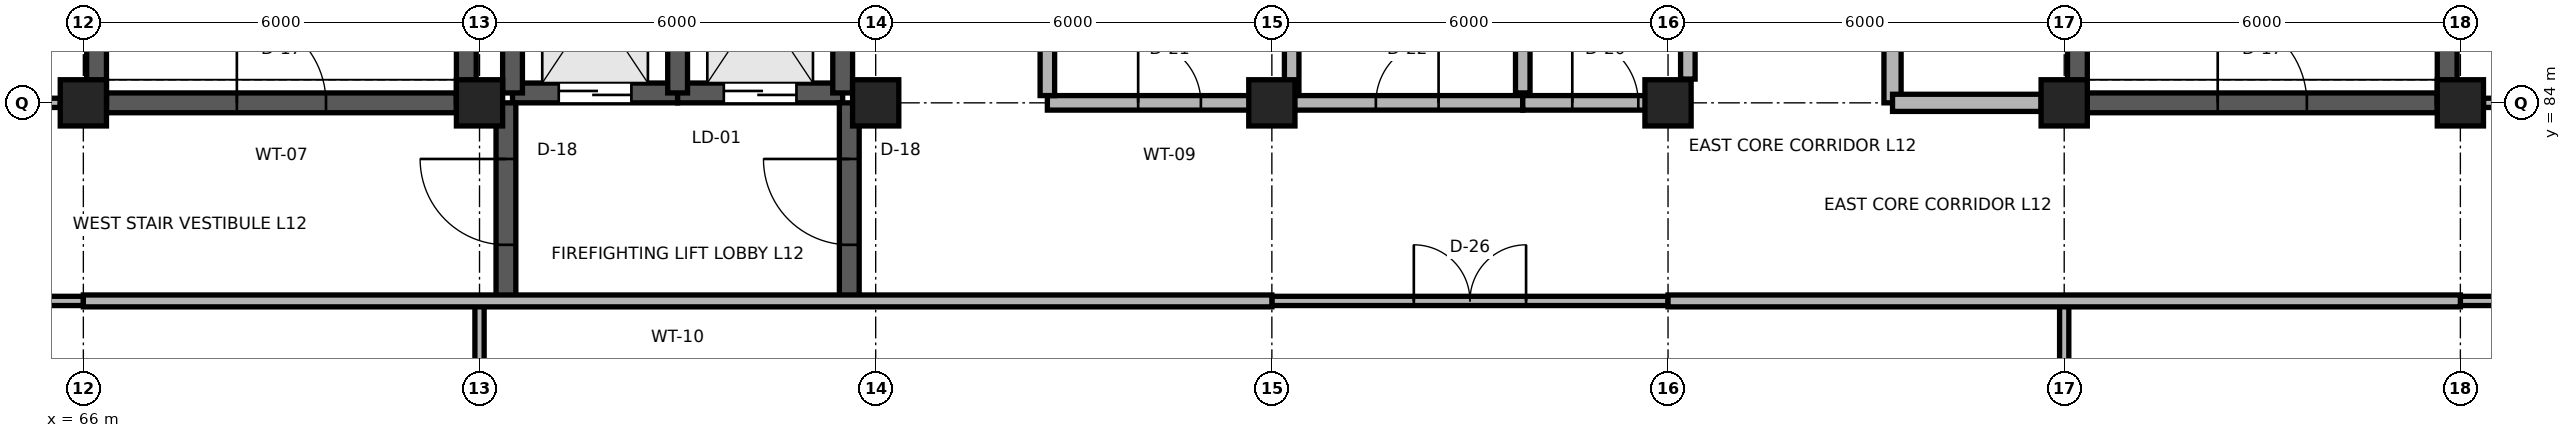
"""IFC4 building model, lengths in metres.
Left out: names, types, materials, properties, quantities, classifications, styles, units other than length and angle.
Written with IfcOpenShell. Run it as: python <this file> out.ifc"""

import sys

from ifc_helpers import new_model, si_unit, direction, frame, frame_2d, origin, origin_2d, place, context, subcontext, project, spatial, rectangle, extrude, element, fill, save


model = new_model("IFC4")
c1 = context("Model", 3, precision=1e-05, world=origin(), true_north=direction((0.0, 1.0)))
c2 = subcontext(c1, "Body", "Model", "MODEL_VIEW")
j1 = project(units=[si_unit("LENGTHUNIT", "METRE"), si_unit("PLANEANGLEUNIT", "RADIAN")], contexts=[c1])
p1 = place(None, origin())
s1 = spatial("IfcSite", under=j1, at=p1, CompositionType="ELEMENT")
p2 = place(p1, origin())
s2 = spatial("IfcBuilding", under=s1, at=p2, CompositionType="ELEMENT")
p3 = place(p2, frame((0.0, 0.0, 48.3)))
s3 = spatial("IfcBuildingStorey", under=s2, at=p3, CompositionType="ELEMENT", Elevation=48.3)
for number, where, z_axis, x_axis in (
    (1, (66.0, 84.0, 0.0), (0.0, 0.0, 1.0), (1.0, 0.0, 0.0)),
    (2, (72.0, 84.0, 0.0), (0.0, 0.0, 1.0), (1.0, 0.0, 0.0)),
    (3, (78.0, 84.0, 0.0), (0.0, 0.0, 1.0), (1.0, 0.0, 0.0)),
    (4, (84.0, 84.0, 0.0), (0.0, 0.0, 1.0), (1.0, 0.0, 0.0)),
    (5, (90.0, 84.0, 0.0), (0.0, 0.0, 1.0), (1.0, 0.0, 0.0)),
    (6, (96.0, 84.0, 0.0), (0.0, 0.0, 1.0), (1.0, 0.0, 0.0)),
    (7, (102.0, 84.0, 0.0), (0.0, 0.0, 1.0), (1.0, 0.0, 0.0)),
):
    element("IfcColumn", number, at=place(p3, frame(where, z_axis=z_axis, x_axis=x_axis)), inside=s3, PredefinedType="COLUMN", context=c2, shape_type="SweptSolid", body=[
        extrude(rectangle(XDim=0.7, YDim=0.7, at=origin_2d()), origin(), (0.0, 0.0, 1.0), 3.9),
    ])
p4 = place(p3, frame((66.35, 84.0, 0.0), z_axis=(0.0, 0.0, 1.0), x_axis=(1.0, 0.0, 0.0)))
e8 = element("IfcWall", 8, at=p4, inside=s3, PredefinedType="SHEAR", context=c2, shape_type="SweptSolid", body=[
    extrude(rectangle(XDim=5.3, YDim=0.3, at=frame_2d((2.65, 0.0))), origin(), (0.0, 0.0, 1.0), 3.66),
])
p5 = place(p4, frame((1.975, 0.0, 0.0)))
e9 = element("IfcOpeningElement", 9, at=p5, cuts=e8, PredefinedType="OPENING", context=c2, shape_type="SweptSolid", body=[
    extrude(rectangle(XDim=1.35, YDim=2.2, at=frame_2d((0.675, 1.1))), frame((0.0, 0.165, 0.0), z_axis=(0.0, -1.0, 0.0), x_axis=(1.0, 0.0, 0.0)), (0.0, 0.0, 1.0), 0.33),
])
for number, where, z_axis, x_axis in (
    (10, (66.2, 84.0, 0.0), (0.0, 0.0, 1.0), (0.0, 1.0, 0.0)),
    (11, (71.8, 84.0, 0.0), (0.0, 0.0, 1.0), (0.0, 1.0, 0.0)),
):
    element("IfcWall", number, at=place(p3, frame(where, z_axis=z_axis, x_axis=x_axis)), inside=s3, PredefinedType="SHEAR", context=c2, shape_type="SweptSolid", body=[
        extrude(rectangle(XDim=11.8, YDim=0.3, at=frame_2d((5.9, 0.0))), origin(), (0.0, 0.0, 1.0), 3.74),
    ])
p6 = place(p3, frame((96.35, 84.0, 0.0), z_axis=(0.0, 0.0, 1.0), x_axis=(1.0, 0.0, 0.0)))
e12 = element("IfcWall", 12, at=p6, inside=s3, PredefinedType="SHEAR", context=c2, shape_type="SweptSolid", body=[
    extrude(rectangle(XDim=5.3, YDim=0.3, at=frame_2d((2.65, 0.0))), origin(), (0.0, 0.0, 1.0), 3.66),
])
p7 = place(p6, frame((1.975, 0.0, 0.0)))
e13 = element("IfcOpeningElement", 13, at=p7, cuts=e12, PredefinedType="OPENING", context=c2, shape_type="SweptSolid", body=[
    extrude(rectangle(XDim=1.35, YDim=2.2, at=frame_2d((0.675, 1.1))), frame((0.0, 0.165, 0.0), z_axis=(0.0, -1.0, 0.0), x_axis=(1.0, 0.0, 0.0)), (0.0, 0.0, 1.0), 0.33),
])
for number, where, z_axis, x_axis in (
    (14, (96.2, 84.0, 0.0), (0.0, 0.0, 1.0), (0.0, 1.0, 0.0)),
    (15, (101.8, 84.0, 0.0), (0.0, 0.0, 1.0), (0.0, 1.0, 0.0)),
):
    element("IfcWall", number, at=place(p3, frame(where, z_axis=z_axis, x_axis=x_axis)), inside=s3, PredefinedType="SHEAR", context=c2, shape_type="SweptSolid", body=[
        extrude(rectangle(XDim=11.8, YDim=0.3, at=frame_2d((5.9, 0.0))), origin(), (0.0, 0.0, 1.0), 3.74),
    ])
p8 = place(p3, frame((72.5, 84.15, 0.0), z_axis=(0.0, 0.0, 1.0), x_axis=(1.0, 0.0, 0.0)))
e16 = element("IfcWall", 16, at=p8, inside=s3, PredefinedType="SHEAR", context=c2, shape_type="SweptSolid", body=[
    extrude(rectangle(XDim=2.5, YDim=0.3, at=frame_2d((1.25, 0.0))), origin(), (0.0, 0.0, 1.0), 3.74),
])
p9 = place(p8, frame((0.7, 0.0, 0.0)))
e17 = element("IfcOpeningElement", 17, at=p9, cuts=e16, PredefinedType="OPENING", context=c2, shape_type="SweptSolid", body=[
    extrude(rectangle(XDim=1.1, YDim=2.1, at=frame_2d((0.55, 1.05))), frame((0.0, 0.165, 0.0), z_axis=(0.0, -1.0, 0.0), x_axis=(1.0, 0.0, 0.0)), (0.0, 0.0, 1.0), 0.33),
])
p10 = place(p3, frame((72.5, 84.15, 0.0), z_axis=(0.0, 0.0, 1.0), x_axis=(0.0, 1.0, 0.0)))
e18 = element("IfcWall", 18, at=p10, inside=s3, PredefinedType="SHEAR", context=c2, shape_type="SweptSolid", body=[
    extrude(rectangle(XDim=3.4, YDim=0.3, at=frame_2d((1.7, 0.0))), origin(), (0.0, 0.0, 1.0), 3.74),
])
p11 = place(p3, frame((75.0, 84.15, 0.0), z_axis=(0.0, 0.0, 1.0), x_axis=(1.0, 0.0, 0.0)))
e19 = element("IfcWall", 19, at=p11, inside=s3, PredefinedType="SHEAR", context=c2, shape_type="SweptSolid", body=[
    extrude(rectangle(XDim=2.5, YDim=0.3, at=frame_2d((1.25, 0.0))), origin(), (0.0, 0.0, 1.0), 3.74),
])
p12 = place(p11, frame((0.7, 0.0, 0.0)))
e20 = element("IfcOpeningElement", 20, at=p12, cuts=e19, PredefinedType="OPENING", context=c2, shape_type="SweptSolid", body=[
    extrude(rectangle(XDim=1.1, YDim=2.1, at=frame_2d((0.55, 1.05))), frame((0.0, 0.165, 0.0), z_axis=(0.0, -1.0, 0.0), x_axis=(1.0, 0.0, 0.0)), (0.0, 0.0, 1.0), 0.33),
])
for number, where, z_axis, x_axis in (
    (21, (75.0, 84.15, 0.0), (0.0, 0.0, 1.0), (0.0, 1.0, 0.0)),
    (22, (77.5, 84.15, 0.0), (0.0, 0.0, 1.0), (0.0, 1.0, 0.0)),
):
    element("IfcWall", number, at=place(p3, frame(where, z_axis=z_axis, x_axis=x_axis)), inside=s3, PredefinedType="SHEAR", context=c2, shape_type="SweptSolid", body=[
        extrude(rectangle(XDim=3.4, YDim=0.3, at=frame_2d((1.7, 0.0))), origin(), (0.0, 0.0, 1.0), 3.74),
    ])
p13 = place(p3, frame((93.4, 84.0, 0.0), z_axis=(0.0, 0.0, 1.0), x_axis=(0.0, 1.0, 0.0)))
e23 = element("IfcWall", 23, at=p13, inside=s3, PredefinedType="PARTITIONING", context=c2, shape_type="SweptSolid", body=[
    extrude(rectangle(XDim=11.96, YDim=0.26, at=frame_2d((5.98, 0.0))), origin(), (0.0, 0.0, 1.0), 3.68),
])
p14 = place(p13, frame((3.425, 0.0, 0.0)))
e24 = element("IfcOpeningElement", 24, at=p14, cuts=e23, PredefinedType="OPENING", context=c2, shape_type="SweptSolid", body=[
    extrude(rectangle(XDim=1.15, YDim=2.2, at=frame_2d((0.575, 1.1))), frame((0.0, 0.145, 0.0), z_axis=(0.0, -1.0, 0.0), x_axis=(1.0, 0.0, 0.0)), (0.0, 0.0, 1.0), 0.29),
])
p15 = place(p3, frame((93.4, 84.0, 0.0), z_axis=(0.0, 0.0, 1.0), x_axis=(1.0, 0.0, 0.0)))
e25 = element("IfcWall", 25, at=p15, inside=s3, PredefinedType="PARTITIONING", context=c2, shape_type="SweptSolid", body=[
    extrude(rectangle(XDim=2.25, YDim=0.26, at=frame_2d((1.125, 0.0))), origin(), (0.0, 0.0, 1.0), 3.288),
])
p16 = place(p3, frame((72.4, 81.0, 0.0), z_axis=(0.0, 0.0, 1.0), x_axis=(0.0, 1.0, 0.0)))
e26 = element("IfcWall", 26, at=p16, inside=s3, PredefinedType="SHEAR", context=c2, shape_type="SweptSolid", body=[
    extrude(rectangle(XDim=3.0, YDim=0.3, at=frame_2d((1.5, 0.0))), origin(), (0.0, 0.0, 1.0), 3.68),
])
p17 = place(p16, frame((0.85, 0.0, 0.0)))
e27 = element("IfcOpeningElement", 27, at=p17, cuts=e26, PredefinedType="OPENING", context=c2, shape_type="SweptSolid", body=[
    extrude(rectangle(XDim=1.3, YDim=2.2, at=frame_2d((0.65, 1.1))), frame((0.0, 0.165, 0.0), z_axis=(0.0, -1.0, 0.0), x_axis=(1.0, 0.0, 0.0)), (0.0, 0.0, 1.0), 0.33),
])
p18 = place(p3, frame((77.6, 81.0, 0.0), z_axis=(0.0, 0.0, 1.0), x_axis=(0.0, 1.0, 0.0)))
e28 = element("IfcWall", 28, at=p18, inside=s3, PredefinedType="SHEAR", context=c2, shape_type="SweptSolid", body=[
    extrude(rectangle(XDim=3.0, YDim=0.3, at=frame_2d((1.5, 0.0))), origin(), (0.0, 0.0, 1.0), 3.68),
])
p19 = place(p18, frame((0.85, 0.0, 0.0)))
e29 = element("IfcOpeningElement", 29, at=p19, cuts=e28, PredefinedType="OPENING", context=c2, shape_type="SweptSolid", body=[
    extrude(rectangle(XDim=1.3, YDim=2.2, at=frame_2d((0.65, 1.1))), frame((0.0, 0.165, 0.0), z_axis=(0.0, -1.0, 0.0), x_axis=(1.0, 0.0, 0.0)), (0.0, 0.0, 1.0), 0.33),
])
p20 = place(p3, frame((80.6, 84.0, 0.0), z_axis=(0.0, 0.0, 1.0), x_axis=(1.0, 0.0, 0.0)))
e30 = element("IfcWall", 30, at=p20, inside=s3, PredefinedType="PARTITIONING", context=c2, shape_type="SweptSolid", body=[
    extrude(rectangle(XDim=3.7, YDim=0.22, at=frame_2d((1.85, 0.0))), origin(), (0.0, 0.0, 1.0), 3.288),
])
p21 = place(p20, frame((1.375, 0.0, 0.0)))
e31 = element("IfcOpeningElement", 31, at=p21, cuts=e30, PredefinedType="OPENING", context=c2, shape_type="SweptSolid", body=[
    extrude(rectangle(XDim=0.95, YDim=2.15, at=frame_2d((0.475, 1.075))), frame((0.0, 0.125, 0.0), z_axis=(0.0, -1.0, 0.0), x_axis=(1.0, 0.0, 0.0)), (0.0, 0.0, 1.0), 0.25),
])
p22 = place(p3, frame((84.3, 84.0, 0.0), z_axis=(0.0, 0.0, 1.0), x_axis=(1.0, 0.0, 0.0)))
e32 = element("IfcWall", 32, at=p22, inside=s3, PredefinedType="PARTITIONING", context=c2, shape_type="SweptSolid", body=[
    extrude(rectangle(XDim=3.5, YDim=0.22, at=frame_2d((1.75, 0.0))), origin(), (0.0, 0.0, 1.0), 3.288),
])
p23 = place(p22, frame((1.275, 0.0, 0.0)))
e33 = element("IfcOpeningElement", 33, at=p23, cuts=e32, PredefinedType="OPENING", context=c2, shape_type="SweptSolid", body=[
    extrude(rectangle(XDim=0.95, YDim=2.1, at=frame_2d((0.475, 1.05))), frame((0.0, 0.125, 0.0), z_axis=(0.0, -1.0, 0.0), x_axis=(1.0, 0.0, 0.0)), (0.0, 0.0, 1.0), 0.25),
])
p24 = place(p3, frame((87.8, 84.0, 0.0), z_axis=(0.0, 0.0, 1.0), x_axis=(1.0, 0.0, 0.0)))
e34 = element("IfcWall", 34, at=p24, inside=s3, PredefinedType="PARTITIONING", context=c2, shape_type="SweptSolid", body=[
    extrude(rectangle(XDim=2.5, YDim=0.22, at=frame_2d((1.25, 0.0))), origin(), (0.0, 0.0, 1.0), 3.288),
])
p25 = place(p24, frame((0.75, 0.0, 0.0)))
e35 = element("IfcOpeningElement", 35, at=p25, cuts=e34, PredefinedType="OPENING", context=c2, shape_type="SweptSolid", body=[
    extrude(rectangle(XDim=1.0, YDim=2.15, at=frame_2d((0.5, 1.075))), frame((0.0, 0.125, 0.0), z_axis=(0.0, -1.0, 0.0), x_axis=(1.0, 0.0, 0.0)), (0.0, 0.0, 1.0), 0.25),
])
for number, where, z_axis, x_axis in (
    (36, (84.3, 84.15, 0.0), (0.0, 0.0, 1.0), (0.0, 1.0, 0.0)),
    (37, (87.8, 84.15, 0.0), (0.0, 0.0, 1.0), (0.0, 1.0, 0.0)),
):
    element("IfcWall", number, at=place(p3, frame(where, z_axis=z_axis, x_axis=x_axis)), inside=s3, PredefinedType="PARTITIONING", context=c2, shape_type="SweptSolid", body=[
        extrude(rectangle(XDim=5.0, YDim=0.22, at=frame_2d((2.5, 0.0))), origin(), (0.0, 0.0, 1.0), 3.68),
    ])
p26 = place(p3, frame((61.7, 81.0, 0.0), z_axis=(0.0, 0.0, 1.0), x_axis=(1.0, 0.0, 0.0)))
e38 = element("IfcWall", 38, at=p26, inside=s3, PredefinedType="PARTITIONING", context=c2, shape_type="SweptSolid", body=[
    extrude(rectangle(XDim=4.3, YDim=0.14, at=frame_2d((2.15, 0.0))), origin(), (0.0, 0.0, 1.0), 3.68),
])
p27 = place(p26, frame((1.625, 0.0, 0.0)))
e39 = element("IfcOpeningElement", 39, at=p27, cuts=e38, PredefinedType="OPENING", context=c2, shape_type="SweptSolid", body=[
    extrude(rectangle(XDim=1.05, YDim=2.25, at=frame_2d((0.525, 1.125))), frame((0.0, 0.085, 0.0), z_axis=(0.0, -1.0, 0.0), x_axis=(1.0, 0.0, 0.0)), (0.0, 0.0, 1.0), 0.17),
])
p28 = place(p3, frame((84.0, 81.0, 0.0), z_axis=(0.0, 0.0, 1.0), x_axis=(1.0, 0.0, 0.0)))
e40 = element("IfcWall", 40, at=p28, inside=s3, PredefinedType="PARTITIONING", context=c2, shape_type="SweptSolid", body=[
    extrude(rectangle(XDim=6.0, YDim=0.14, at=frame_2d((3.0, 0.0))), origin(), (0.0, 0.0, 1.0), 3.68),
])
p29 = place(p28, frame((2.15, 0.0, 0.0)))
e41 = element("IfcOpeningElement", 41, at=p29, cuts=e40, PredefinedType="OPENING", context=c2, shape_type="SweptSolid", body=[
    extrude(rectangle(XDim=1.7, YDim=2.45, at=frame_2d((0.85, 1.225))), frame((0.0, 0.085, 0.0), z_axis=(0.0, -1.0, 0.0), x_axis=(1.0, 0.0, 0.0)), (0.0, 0.0, 1.0), 0.17),
])
p30 = place(p3, frame((102.0, 81.0, 0.0), z_axis=(0.0, 0.0, 1.0), x_axis=(1.0, 0.0, 0.0)))
e42 = element("IfcWall", 42, at=p30, inside=s3, PredefinedType="PARTITIONING", context=c2, shape_type="SweptSolid", body=[
    extrude(rectangle(XDim=4.3, YDim=0.14, at=frame_2d((2.15, 0.0))), origin(), (0.0, 0.0, 1.0), 3.68),
])
p31 = place(p30, frame((1.625, 0.0, 0.0)))
e43 = element("IfcOpeningElement", 43, at=p31, cuts=e42, PredefinedType="OPENING", context=c2, shape_type="SweptSolid", body=[
    extrude(rectangle(XDim=1.05, YDim=2.25, at=frame_2d((0.525, 1.125))), frame((0.0, 0.085, 0.0), z_axis=(0.0, -1.0, 0.0), x_axis=(1.0, 0.0, 0.0)), (0.0, 0.0, 1.0), 0.17),
])
p32 = place(p3, frame((60.35, 84.0, 0.0), z_axis=(0.0, 0.0, 1.0), x_axis=(1.0, 0.0, 0.0)))
e44 = element("IfcWall", 44, at=p32, inside=s3, PredefinedType="PARTITIONING", context=c2, shape_type="SweptSolid", body=[
    extrude(rectangle(XDim=5.3, YDim=0.14, at=frame_2d((2.65, 0.0))), origin(), (0.0, 0.0, 1.0), 3.288),
])
p33 = place(p32, frame((2.19, 0.0, 0.0)))
e45 = element("IfcOpeningElement", 45, at=p33, cuts=e44, PredefinedType="OPENING", context=c2, shape_type="SweptSolid", body=[
    extrude(rectangle(XDim=0.92, YDim=2.15, at=frame_2d((0.46, 1.075))), frame((0.0, 0.085, 0.0), z_axis=(0.0, -1.0, 0.0), x_axis=(1.0, 0.0, 0.0)), (0.0, 0.0, 1.0), 0.17),
])
p34 = place(p3, frame((102.35, 84.0, 0.0), z_axis=(0.0, 0.0, 1.0), x_axis=(1.0, 0.0, 0.0)))
e46 = element("IfcWall", 46, at=p34, inside=s3, PredefinedType="PARTITIONING", context=c2, shape_type="SweptSolid", body=[
    extrude(rectangle(XDim=5.3, YDim=0.14, at=frame_2d((2.65, 0.0))), origin(), (0.0, 0.0, 1.0), 3.288),
])
p35 = place(p34, frame((2.19, 0.0, 0.0)))
e47 = element("IfcOpeningElement", 47, at=p35, cuts=e46, PredefinedType="OPENING", context=c2, shape_type="SweptSolid", body=[
    extrude(rectangle(XDim=0.92, YDim=2.15, at=frame_2d((0.46, 1.075))), frame((0.0, 0.085, 0.0), z_axis=(0.0, -1.0, 0.0), x_axis=(1.0, 0.0, 0.0)), (0.0, 0.0, 1.0), 0.17),
])
for number, where, z_axis, x_axis in (
    (48, (72.0, 72.65, 0.0), (0.0, 0.0, 1.0), (0.0, 1.0, 0.0)),
    (49, (96.0, 72.65, 0.0), (0.0, 0.0, 1.0), (0.0, 1.0, 0.0)),
):
    element("IfcWall", number, at=place(p3, frame(where, z_axis=z_axis, x_axis=x_axis)), inside=s3, PredefinedType="PARTITIONING", context=c2, shape_type="SweptSolid", body=[
        extrude(rectangle(XDim=8.35, YDim=0.14, at=frame_2d((4.175, 0.0))), origin(), (0.0, 0.0, 1.0), 3.288),
    ])
p36 = place(p3, frame((80.6, 84.11, 0.0), z_axis=(0.0, 0.0, 1.0), x_axis=(0.0, 1.0, 0.0)))
e50 = element("IfcWall", 50, at=p36, inside=s3, PredefinedType="PARTITIONING", context=c2, shape_type="SweptSolid", body=[
    extrude(rectangle(XDim=4.98, YDim=0.22, at=frame_2d((2.49, 0.0))), origin(), (0.0, 0.0, 1.0), 3.68),
])
p37 = place(p3, frame((90.3, 84.36, 0.0), z_axis=(0.0, 0.0, 1.0), x_axis=(0.0, 1.0, 0.0)))
e51 = element("IfcWall", 51, at=p37, inside=s3, PredefinedType="PARTITIONING", context=c2, shape_type="SweptSolid", body=[
    extrude(rectangle(XDim=4.73, YDim=0.22, at=frame_2d((2.365, 0.0))), origin(), (0.0, 0.0, 1.0), 3.68),
])
p38 = place(p3, frame((66.0, 81.0, 0.0), z_axis=(0.0, 0.0, 1.0), x_axis=(1.0, 0.0, 0.0)))
e52 = element("IfcWall", 52, at=p38, inside=s3, PredefinedType="PARTITIONING", context=c2, shape_type="SweptSolid", body=[
    extrude(rectangle(XDim=18.0, YDim=0.18, at=frame_2d((9.0, 0.0))), origin(), (0.0, 0.0, 1.0), 3.68),
])
p39 = place(p3, frame((90.0, 81.0, 0.0), z_axis=(0.0, 0.0, 1.0), x_axis=(1.0, 0.0, 0.0)))
e53 = element("IfcWall", 53, at=p39, inside=s3, PredefinedType="PARTITIONING", context=c2, shape_type="SweptSolid", body=[
    extrude(rectangle(XDim=12.0, YDim=0.18, at=frame_2d((6.0, 0.0))), origin(), (0.0, 0.0, 1.0), 3.68),
])
p40 = place(p5, origin())
e54 = element("IfcDoor", 54, at=p40, inside=s3, OperationType="SINGLE_SWING_LEFT", PredefinedType="DOOR", context=c2, shape_type="SweptSolid", body=[
    extrude(rectangle(XDim=1.35, YDim=2.2, at=frame_2d((0.675, 1.1))), frame((0.0, 0.025, 0.0), z_axis=(0.0, -1.0, 0.0), x_axis=(1.0, 0.0, 0.0)), (0.0, 0.0, 1.0), 0.05),
])
fill(e9, e54)
p41 = place(p7, origin())
e55 = element("IfcDoor", 55, at=p41, inside=s3, OperationType="SINGLE_SWING_LEFT", PredefinedType="DOOR", context=c2, shape_type="SweptSolid", body=[
    extrude(rectangle(XDim=1.35, YDim=2.2, at=frame_2d((0.675, 1.1))), frame((0.0, 0.025, 0.0), z_axis=(0.0, -1.0, 0.0), x_axis=(1.0, 0.0, 0.0)), (0.0, 0.0, 1.0), 0.05),
])
fill(e13, e55)
p42 = place(p9, origin())
e56 = element("IfcDoor", 56, at=p42, inside=s3, OperationType="DOUBLE_DOOR_SLIDING", PredefinedType="DOOR", context=c2, shape_type="SweptSolid", body=[
    extrude(rectangle(XDim=1.1, YDim=2.1, at=frame_2d((0.55, 1.05))), frame((0.0, 0.025, 0.0), z_axis=(0.0, -1.0, 0.0), x_axis=(1.0, 0.0, 0.0)), (0.0, 0.0, 1.0), 0.05),
])
fill(e17, e56)
p43 = place(p12, origin())
e57 = element("IfcDoor", 57, at=p43, inside=s3, OperationType="DOUBLE_DOOR_SLIDING", PredefinedType="DOOR", context=c2, shape_type="SweptSolid", body=[
    extrude(rectangle(XDim=1.1, YDim=2.1, at=frame_2d((0.55, 1.05))), frame((0.0, 0.025, 0.0), z_axis=(0.0, -1.0, 0.0), x_axis=(1.0, 0.0, 0.0)), (0.0, 0.0, 1.0), 0.05),
])
fill(e20, e57)
p44 = place(p17, origin())
e58 = element("IfcDoor", 58, at=p44, inside=s3, OperationType="SINGLE_SWING_RIGHT", PredefinedType="DOOR", context=c2, shape_type="SweptSolid", body=[
    extrude(rectangle(XDim=1.3, YDim=2.2, at=frame_2d((0.65, 1.1))), frame((0.0, 0.025, 0.0), z_axis=(0.0, -1.0, 0.0), x_axis=(1.0, 0.0, 0.0)), (0.0, 0.0, 1.0), 0.05),
])
fill(e27, e58)
p45 = place(p19, origin())
e59 = element("IfcDoor", 59, at=p45, inside=s3, OperationType="SINGLE_SWING_RIGHT", PredefinedType="DOOR", context=c2, shape_type="SweptSolid", body=[
    extrude(rectangle(XDim=1.3, YDim=2.2, at=frame_2d((0.65, 1.1))), frame((0.0, 0.025, 0.0), z_axis=(0.0, -1.0, 0.0), x_axis=(1.0, 0.0, 0.0)), (0.0, 0.0, 1.0), 0.05),
])
fill(e29, e59)
p46 = place(p21, origin())
e60 = element("IfcDoor", 60, at=p46, inside=s3, OperationType="SINGLE_SWING_LEFT", PredefinedType="DOOR", context=c2, shape_type="SweptSolid", body=[
    extrude(rectangle(XDim=0.95, YDim=2.15, at=frame_2d((0.475, 1.075))), frame((0.0, 0.025, 0.0), z_axis=(0.0, -1.0, 0.0), x_axis=(1.0, 0.0, 0.0)), (0.0, 0.0, 1.0), 0.05),
])
fill(e31, e60)
p47 = place(p23, origin())
e61 = element("IfcDoor", 61, at=p47, inside=s3, OperationType="SINGLE_SWING_RIGHT", PredefinedType="DOOR", context=c2, shape_type="SweptSolid", body=[
    extrude(rectangle(XDim=0.95, YDim=2.1, at=frame_2d((0.475, 1.05))), frame((0.0, 0.025, 0.0), z_axis=(0.0, -1.0, 0.0), x_axis=(1.0, 0.0, 0.0)), (0.0, 0.0, 1.0), 0.05),
])
fill(e33, e61)
p48 = place(p25, origin())
e62 = element("IfcDoor", 62, at=p48, inside=s3, OperationType="SINGLE_SWING_LEFT", PredefinedType="DOOR", context=c2, shape_type="SweptSolid", body=[
    extrude(rectangle(XDim=1.0, YDim=2.15, at=frame_2d((0.5, 1.075))), frame((0.0, 0.025, 0.0), z_axis=(0.0, -1.0, 0.0), x_axis=(1.0, 0.0, 0.0)), (0.0, 0.0, 1.0), 0.05),
])
fill(e35, e62)
p49 = place(p29, origin())
e63 = element("IfcDoor", 63, at=p49, inside=s3, OperationType="DOUBLE_DOOR_SINGLE_SWING", PredefinedType="DOOR", context=c2, shape_type="SweptSolid", body=[
    extrude(rectangle(XDim=1.7, YDim=2.45, at=frame_2d((0.85, 1.225))), frame((0.0, 0.025, 0.0), z_axis=(0.0, -1.0, 0.0), x_axis=(1.0, 0.0, 0.0)), (0.0, 0.0, 1.0), 0.05),
])
fill(e41, e63)
save(model, sys.argv[1])
